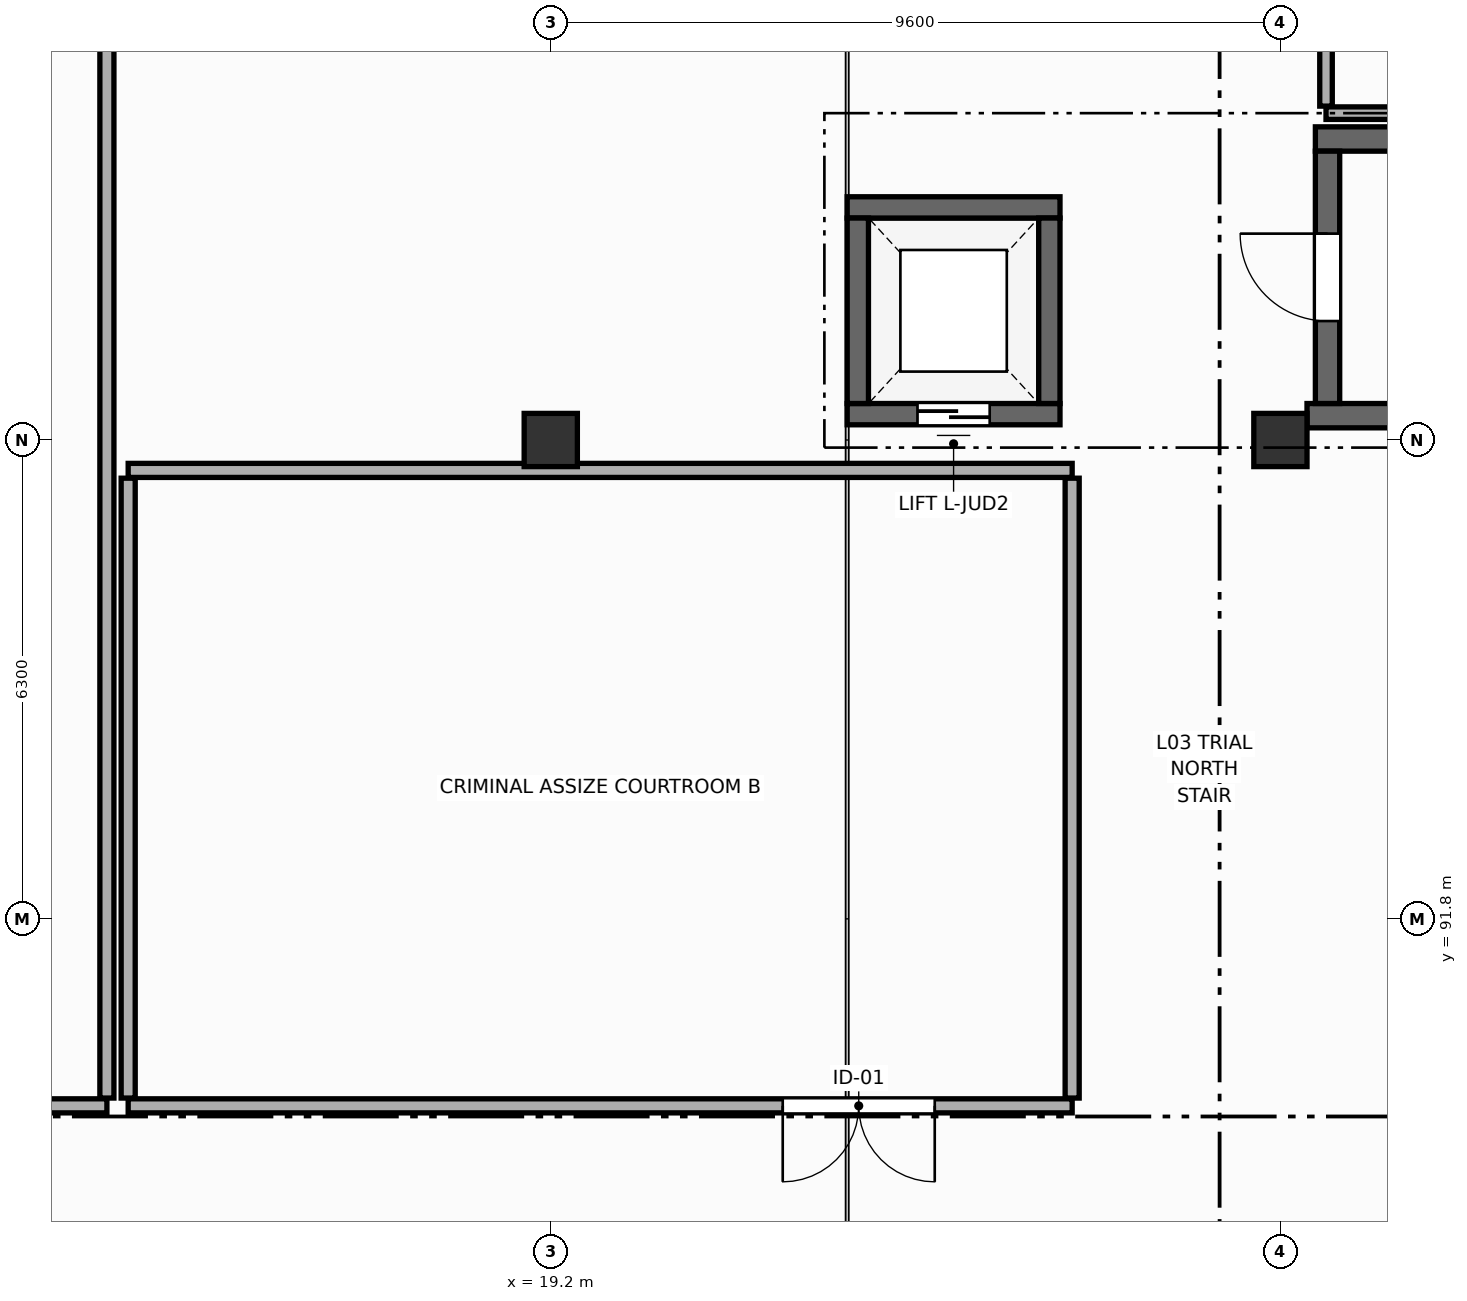
"""IFC4 building model, lengths in metres.
Left out: names, types, materials, properties, quantities, classifications, styles, units other than length and angle.
Written with IfcOpenShell. Run it as: python <this file> out.ifc"""

import sys

from ifc_helpers import new_model, si_unit, direction, frame, frame_2d, origin, origin_2d, place, context, subcontext, project, spatial, rectangle, extrude, element, fill, save


model = new_model("IFC4")
c1 = context("Model", 3, precision=1e-05, world=origin(), true_north=direction((0.0, 1.0)))
c2 = subcontext(c1, "Body", "Model", "MODEL_VIEW")
j1 = project(units=[si_unit("LENGTHUNIT", "METRE"), si_unit("PLANEANGLEUNIT", "RADIAN")], contexts=[c1])
p1 = place(None, origin())
s1 = spatial("IfcSite", under=j1, at=p1, CompositionType="ELEMENT")
p2 = place(p1, origin())
s2 = spatial("IfcBuilding", under=s1, at=p2, CompositionType="ELEMENT")
p3 = place(p2, frame((0.0, 0.0, 9.9)))
s3 = spatial("IfcBuildingStorey", under=s2, at=p3, CompositionType="ELEMENT", Elevation=9.9)
for number, where, z_axis, x_axis in (
    (1, (19.2, 98.1, 0.0), (0.0, 0.0, 1.0), (1.0, 0.0, 0.0)),
    (2, (28.8, 98.1, 0.0), (0.0, 0.0, 1.0), (1.0, 0.0, 0.0)),
):
    element("IfcColumn", number, at=place(p3, frame(where, z_axis=z_axis, x_axis=x_axis)), inside=s3, PredefinedType="COLUMN", context=c2, shape_type="SweptSolid", body=[
        extrude(rectangle(XDim=0.7, YDim=0.7, at=origin_2d()), origin(), (0.0, 0.0, 1.0), 4.5),
    ])
p4 = place(p3, frame((29.26, 102.06, 0.0), z_axis=(0.0, 0.0, 1.0), x_axis=(1.0, 0.0, 0.0)))
e3 = element("IfcWall", 3, at=p4, inside=s3, PredefinedType="SHEAR", context=c2, shape_type="SweptSolid", body=[
    extrude(rectangle(XDim=9.18, YDim=0.32, at=frame_2d((4.59, 0.0))), origin(), (0.0, 0.0, 1.0), 4.25),
])
p5 = place(p3, frame((38.44, 98.42, 0.0), z_axis=(0.0, 0.0, 1.0), x_axis=(-1.0, 0.0, 0.0)))
e4 = element("IfcWall", 4, at=p5, inside=s3, PredefinedType="SHEAR", context=c2, shape_type="SweptSolid", body=[
    extrude(rectangle(XDim=9.29, YDim=0.32, at=frame_2d((4.645, 0.0))), origin(), (0.0, 0.0, 1.0), 4.25),
])
p6 = place(p3, frame((29.42, 98.58, 0.0), z_axis=(0.0, 0.0, 1.0), x_axis=(0.0, 1.0, 0.0)))
e5 = element("IfcWall", 5, at=p6, inside=s3, PredefinedType="SHEAR", context=c2, shape_type="SweptSolid", body=[
    extrude(rectangle(XDim=3.32, YDim=0.32, at=frame_2d((1.66, 0.0))), origin(), (0.0, 0.0, 1.0), 4.25),
])
p7 = place(p6, frame((1.085, 0.0, 0.0)))
e6 = element("IfcOpeningElement", 6, at=p7, cuts=e5, PredefinedType="OPENING", context=c2, shape_type="SweptSolid", body=[
    extrude(rectangle(XDim=1.15, YDim=2.2, at=frame_2d((0.575, 1.1))), frame((0.0, 0.17, 0.0), z_axis=(0.0, -1.0, 0.0), x_axis=(1.0, 0.0, 0.0)), (0.0, 0.0, 1.0), 0.34),
])
p8 = place(p3, frame((23.1, 101.16, 0.0), z_axis=(0.0, 0.0, 1.0), x_axis=(1.0, 0.0, 0.0)))
e7 = element("IfcWall", 7, at=p8, inside=s3, PredefinedType="SHEAR", context=c2, shape_type="SweptSolid", body=[
    extrude(rectangle(XDim=2.8, YDim=0.28, at=frame_2d((1.4, 0.0))), origin(), (0.0, 0.0, 1.0), 4.25),
])
p9 = place(p3, frame((25.9, 98.44, 0.0), z_axis=(0.0, 0.0, 1.0), x_axis=(-1.0, 0.0, 0.0)))
e8 = element("IfcWall", 8, at=p9, inside=s3, PredefinedType="SHEAR", context=c2, shape_type="SweptSolid", body=[
    extrude(rectangle(XDim=2.8, YDim=0.28, at=frame_2d((1.4, 0.0))), origin(), (0.0, 0.0, 1.0), 4.25),
])
p10 = place(p9, frame((0.925, 0.0, 0.0)))
e9 = element("IfcOpeningElement", 9, at=p10, cuts=e8, PredefinedType="OPENING", context=c2, shape_type="SweptSolid", body=[
    extrude(rectangle(XDim=0.95, YDim=2.15, at=frame_2d((0.475, 1.075))), frame((0.0, 0.15, 0.0), z_axis=(0.0, -1.0, 0.0), x_axis=(1.0, 0.0, 0.0)), (0.0, 0.0, 1.0), 0.3),
])
for number, where, z_axis, x_axis in (
    (10, (23.24, 98.58, 0.0), (0.0, 0.0, 1.0), (0.0, 1.0, 0.0)),
    (11, (25.76, 101.02, 0.0), (0.0, 0.0, 1.0), (0.0, -1.0, 0.0)),
):
    element("IfcWall", number, at=place(p3, frame(where, z_axis=z_axis, x_axis=x_axis)), inside=s3, PredefinedType="SHEAR", context=c2, shape_type="SweptSolid", body=[
        extrude(rectangle(XDim=2.44, YDim=0.28, at=frame_2d((1.22, 0.0))), origin(), (0.0, 0.0, 1.0), 4.25),
    ])
p11 = place(p3, frame((13.36, 89.34, 0.0), z_axis=(0.0, 0.0, 1.0), x_axis=(-1.0, 0.0, 0.0)))
e12 = element("IfcWall", 12, at=p11, inside=s3, PredefinedType="PARTITIONING", context=c2, shape_type="SweptSolid", body=[
    extrude(rectangle(XDim=12.906, YDim=0.185, at=frame_2d((6.453, 0.0))), origin(), (0.0, 0.0, 1.0), 3.38),
])
p12 = place(p11, frame((1.881, 0.0, 0.0)))
e13 = element("IfcOpeningElement", 13, at=p12, cuts=e12, PredefinedType="OPENING", context=c2, shape_type="SweptSolid", body=[
    extrude(rectangle(XDim=2.0, YDim=2.5, at=frame_2d((1.0, 1.25))), frame((0.0, 0.103, 0.0), z_axis=(0.0, -1.0, 0.0), x_axis=(1.0, 0.0, 0.0)), (0.0, 0.0, 1.0), 0.205),
])
p13 = place(p3, frame((13.36, 112.346, 0.0), z_axis=(0.0, 0.0, 1.0), x_axis=(0.0, -1.0, 0.0)))
e14 = element("IfcWall", 14, at=p13, inside=s3, PredefinedType="PARTITIONING", context=c2, shape_type="SweptSolid", body=[
    extrude(rectangle(XDim=22.904, YDim=0.185, at=frame_2d((11.452, 0.0))), origin(), (0.0, 0.0, 1.0), 3.58),
])
p14 = place(p3, frame((13.64, 97.7, 0.0), z_axis=(0.0, 0.0, 1.0), x_axis=(1.0, 0.0, 0.0)))
e15 = element("IfcWall", 15, at=p14, inside=s3, PredefinedType="PARTITIONING", context=c2, shape_type="SweptSolid", body=[
    extrude(rectangle(XDim=12.42, YDim=0.185, at=frame_2d((6.21, 0.0))), origin(), (0.0, 0.0, 1.0), 3.33),
])
p15 = place(p3, frame((26.06, 89.34, 0.0), z_axis=(0.0, 0.0, 1.0), x_axis=(-1.0, 0.0, 0.0)))
e16 = element("IfcWall", 16, at=p15, inside=s3, PredefinedType="PARTITIONING", context=c2, shape_type="SweptSolid", body=[
    extrude(rectangle(XDim=12.42, YDim=0.185, at=frame_2d((6.21, 0.0))), origin(), (0.0, 0.0, 1.0), 3.38),
])
p16 = place(p15, frame((1.808, 0.0, 0.0)))
e17 = element("IfcOpeningElement", 17, at=p16, cuts=e16, PredefinedType="OPENING", context=c2, shape_type="SweptSolid", body=[
    extrude(rectangle(XDim=2.0, YDim=2.5, at=frame_2d((1.0, 1.25))), frame((0.0, 0.103, 0.0), z_axis=(0.0, -1.0, 0.0), x_axis=(1.0, 0.0, 0.0)), (0.0, 0.0, 1.0), 0.205),
])
for number, where, z_axis, x_axis in (
    (18, (13.64, 89.442, 0.0), (0.0, 0.0, 1.0), (0.0, 1.0, 0.0)),
    (19, (26.06, 97.597, 0.0), (0.0, 0.0, 1.0), (0.0, -1.0, 0.0)),
):
    element("IfcWall", number, at=place(p3, frame(where, z_axis=z_axis, x_axis=x_axis)), inside=s3, PredefinedType="PARTITIONING", context=c2, shape_type="SweptSolid", body=[
        extrude(rectangle(XDim=8.155, YDim=0.185, at=frame_2d((4.078, 0.0))), origin(), (0.0, 0.0, 1.0), 3.63),
    ])
p17 = place(p3, frame((45.6, 102.4, 0.0), z_axis=(0.0, 0.0, 1.0), x_axis=(-1.0, 0.0, 0.0)))
e20 = element("IfcWall", 20, at=p17, inside=s3, PredefinedType="PARTITIONING", context=c2, shape_type="SweptSolid", body=[
    extrude(rectangle(XDim=16.2, YDim=0.165, at=frame_2d((8.1, 0.0))), origin(), (0.0, 0.0, 1.0), 3.33),
])
p18 = place(p3, frame((29.4, 102.492, 0.0), z_axis=(0.0, 0.0, 1.0), x_axis=(0.0, 1.0, 0.0)))
e21 = element("IfcWall", 21, at=p18, inside=s3, PredefinedType="PARTITIONING", context=c2, shape_type="SweptSolid", body=[
    extrude(rectangle(XDim=9.854, YDim=0.165, at=frame_2d((4.927, 0.0))), origin(), (0.0, 0.0, 1.0), 3.63),
])
p19 = place(p18, frame((1.981, 0.0, 0.0)))
e22 = element("IfcOpeningElement", 22, at=p19, cuts=e21, PredefinedType="OPENING", context=c2, shape_type="SweptSolid", body=[
    extrude(rectangle(XDim=1.0, YDim=2.15, at=frame_2d((0.5, 1.075))), frame((0.0, 0.093, 0.0), z_axis=(0.0, -1.0, 0.0), x_axis=(1.0, 0.0, 0.0)), (0.0, 0.0, 1.0), 0.185),
])
p20 = place(p7, origin())
e23 = element("IfcDoor", 23, at=p20, inside=s3, OperationType="SINGLE_SWING_RIGHT", PredefinedType="DOOR", context=c2, shape_type="SweptSolid", body=[
    extrude(rectangle(XDim=1.15, YDim=2.2, at=frame_2d((0.575, 1.1))), frame((0.0, 0.025, 0.0), z_axis=(0.0, -1.0, 0.0), x_axis=(1.0, 0.0, 0.0)), (0.0, 0.0, 1.0), 0.05),
])
fill(e6, e23)
p21 = place(p10, origin())
e24 = element("IfcDoor", 24, at=p21, inside=s3, OperationType="DOUBLE_DOOR_SLIDING", PredefinedType="DOOR", context=c2, shape_type="SweptSolid", body=[
    extrude(rectangle(XDim=0.95, YDim=2.15, at=frame_2d((0.475, 1.075))), frame((0.0, 0.025, 0.0), z_axis=(0.0, -1.0, 0.0), x_axis=(1.0, 0.0, 0.0)), (0.0, 0.0, 1.0), 0.05),
])
fill(e9, e24)
p22 = place(p16, origin())
e25 = element("IfcDoor", 25, at=p22, inside=s3, OperationType="DOUBLE_DOOR_SINGLE_SWING", PredefinedType="DOOR", context=c2, shape_type="SweptSolid", body=[
    extrude(rectangle(XDim=2.0, YDim=2.5, at=frame_2d((1.0, 1.25))), frame((0.0, 0.025, 0.0), z_axis=(0.0, -1.0, 0.0), x_axis=(1.0, 0.0, 0.0)), (0.0, 0.0, 1.0), 0.05),
])
fill(e17, e25)
save(model, sys.argv[1])
